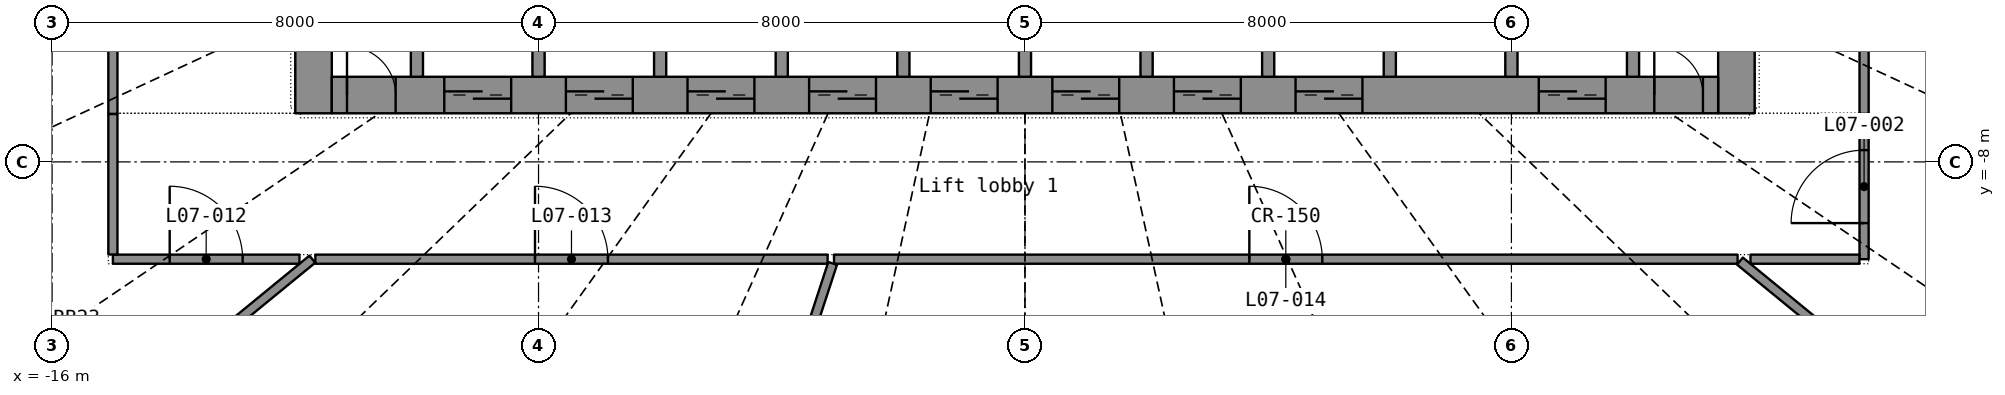
"""IFC4 building model, lengths in metres.
Left out: names, types, materials, properties, quantities, classifications, styles, units other than length and angle.
Written with IfcOpenShell. Run it as: python <this file> out.ifc"""

import sys

from ifc_helpers import new_model, si_unit, direction, frame, frame_2d, origin, place, context, subcontext, project, spatial, rectangle, extrude, element, fill, save


model = new_model("IFC4")
c1 = context("Model", 3, precision=1e-05, world=origin(), true_north=direction((0.0, 1.0)))
c2 = subcontext(c1, "Body", "Model", "MODEL_VIEW")
j1 = project(units=[si_unit("LENGTHUNIT", "METRE"), si_unit("PLANEANGLEUNIT", "RADIAN")], contexts=[c1])
p1 = place(None, origin())
s1 = spatial("IfcSite", under=j1, at=p1, CompositionType="ELEMENT")
p2 = place(p1, origin())
s2 = spatial("IfcBuilding", under=s1, at=p2, CompositionType="ELEMENT")
p3 = place(p2, frame((0.0, 0.0, 37.1)))
s3 = spatial("IfcBuildingStorey", under=s2, at=p3, CompositionType="ELEMENT", Elevation=37.1)
p4 = place(p3, frame((-11.7, -7.2, 0.0), z_axis=(0.0, 0.0, 1.0), x_axis=(0.0, 1.0, 0.0)))
e1 = element("IfcWall", 1, at=p4, inside=s3, PredefinedType="SHEAR", context=c2, shape_type="SweptSolid", body=[
    extrude(rectangle(XDim=14.4, YDim=0.6, at=frame_2d((7.2, 0.0))), origin(), (0.0, 0.0, 1.0), 3.3),
])
p5 = place(p4, frame((6.5, 0.0, 0.0)))
e2 = element("IfcOpeningElement", 2, at=p5, cuts=e1, PredefinedType="OPENING", context=c2, shape_type="SweptSolid", body=[
    extrude(rectangle(XDim=1.4, YDim=2.2, at=frame_2d((0.7, 1.1))), frame((0.0, 0.31, 0.0), z_axis=(0.0, -1.0, 0.0), x_axis=(1.0, 0.0, 0.0)), (0.0, 0.0, 1.0), 0.62),
])
p6 = place(p3, frame((11.7, -7.2, 0.0), z_axis=(0.0, 0.0, 1.0), x_axis=(0.0, 1.0, 0.0)))
e3 = element("IfcWall", 3, at=p6, inside=s3, PredefinedType="SHEAR", context=c2, shape_type="SweptSolid", body=[
    extrude(rectangle(XDim=14.4, YDim=0.6, at=frame_2d((7.2, 0.0))), origin(), (0.0, 0.0, 1.0), 3.3),
])
p7 = place(p6, frame((6.5, 0.0, 0.0)))
e4 = element("IfcOpeningElement", 4, at=p7, cuts=e3, PredefinedType="OPENING", context=c2, shape_type="SweptSolid", body=[
    extrude(rectangle(XDim=1.4, YDim=2.2, at=frame_2d((0.7, 1.1))), frame((0.0, 0.31, 0.0), z_axis=(0.0, -1.0, 0.0), x_axis=(1.0, 0.0, 0.0)), (0.0, 0.0, 1.0), 0.62),
])
p8 = place(p3, frame((-11.4, -6.9, 0.0), z_axis=(0.0, 0.0, 1.0), x_axis=(1.0, 0.0, 0.0)))
e5 = element("IfcWall", 5, at=p8, inside=s3, PredefinedType="SHEAR", context=c2, shape_type="SweptSolid", body=[
    extrude(rectangle(XDim=22.8, YDim=0.6, at=frame_2d((11.4, 0.0))), origin(), (0.0, 0.0, 1.0), 3.3),
])
p9 = place(p8, frame((1.85, 0.0, 0.0)))
e6 = element("IfcOpeningElement", 6, at=p9, cuts=e5, PredefinedType="OPENING", context=c2, shape_type="SweptSolid", body=[
    extrude(rectangle(XDim=1.1, YDim=2.2, at=frame_2d((0.55, 1.1))), frame((0.0, 0.31, 0.0), z_axis=(0.0, -1.0, 0.0), x_axis=(1.0, 0.0, 0.0)), (0.0, 0.0, 1.0), 0.62),
])
p10 = place(p8, frame((3.85, 0.0, 0.0)))
e7 = element("IfcOpeningElement", 7, at=p10, cuts=e5, PredefinedType="OPENING", context=c2, shape_type="SweptSolid", body=[
    extrude(rectangle(XDim=1.1, YDim=2.2, at=frame_2d((0.55, 1.1))), frame((0.0, 0.31, 0.0), z_axis=(0.0, -1.0, 0.0), x_axis=(1.0, 0.0, 0.0)), (0.0, 0.0, 1.0), 0.62),
])
p11 = place(p8, frame((5.85, 0.0, 0.0)))
e8 = element("IfcOpeningElement", 8, at=p11, cuts=e5, PredefinedType="OPENING", context=c2, shape_type="SweptSolid", body=[
    extrude(rectangle(XDim=1.1, YDim=2.2, at=frame_2d((0.55, 1.1))), frame((0.0, 0.31, 0.0), z_axis=(0.0, -1.0, 0.0), x_axis=(1.0, 0.0, 0.0)), (0.0, 0.0, 1.0), 0.62),
])
p12 = place(p8, frame((7.85, 0.0, 0.0)))
e9 = element("IfcOpeningElement", 9, at=p12, cuts=e5, PredefinedType="OPENING", context=c2, shape_type="SweptSolid", body=[
    extrude(rectangle(XDim=1.1, YDim=2.2, at=frame_2d((0.55, 1.1))), frame((0.0, 0.31, 0.0), z_axis=(0.0, -1.0, 0.0), x_axis=(1.0, 0.0, 0.0)), (0.0, 0.0, 1.0), 0.62),
])
p13 = place(p8, frame((9.85, 0.0, 0.0)))
e10 = element("IfcOpeningElement", 10, at=p13, cuts=e5, PredefinedType="OPENING", context=c2, shape_type="SweptSolid", body=[
    extrude(rectangle(XDim=1.1, YDim=2.2, at=frame_2d((0.55, 1.1))), frame((0.0, 0.31, 0.0), z_axis=(0.0, -1.0, 0.0), x_axis=(1.0, 0.0, 0.0)), (0.0, 0.0, 1.0), 0.62),
])
p14 = place(p8, frame((11.85, 0.0, 0.0)))
e11 = element("IfcOpeningElement", 11, at=p14, cuts=e5, PredefinedType="OPENING", context=c2, shape_type="SweptSolid", body=[
    extrude(rectangle(XDim=1.1, YDim=2.2, at=frame_2d((0.55, 1.1))), frame((0.0, 0.31, 0.0), z_axis=(0.0, -1.0, 0.0), x_axis=(1.0, 0.0, 0.0)), (0.0, 0.0, 1.0), 0.62),
])
p15 = place(p8, frame((13.85, 0.0, 0.0)))
e12 = element("IfcOpeningElement", 12, at=p15, cuts=e5, PredefinedType="OPENING", context=c2, shape_type="SweptSolid", body=[
    extrude(rectangle(XDim=1.1, YDim=2.2, at=frame_2d((0.55, 1.1))), frame((0.0, 0.31, 0.0), z_axis=(0.0, -1.0, 0.0), x_axis=(1.0, 0.0, 0.0)), (0.0, 0.0, 1.0), 0.62),
])
p16 = place(p8, frame((15.85, 0.0, 0.0)))
e13 = element("IfcOpeningElement", 13, at=p16, cuts=e5, PredefinedType="OPENING", context=c2, shape_type="SweptSolid", body=[
    extrude(rectangle(XDim=1.1, YDim=2.2, at=frame_2d((0.55, 1.1))), frame((0.0, 0.31, 0.0), z_axis=(0.0, -1.0, 0.0), x_axis=(1.0, 0.0, 0.0)), (0.0, 0.0, 1.0), 0.62),
])
p17 = place(p8, frame((19.85, 0.0, 0.0)))
e14 = element("IfcOpeningElement", 14, at=p17, cuts=e5, PredefinedType="OPENING", context=c2, shape_type="SweptSolid", body=[
    extrude(rectangle(XDim=1.1, YDim=2.2, at=frame_2d((0.55, 1.1))), frame((0.0, 0.31, 0.0), z_axis=(0.0, -1.0, 0.0), x_axis=(1.0, 0.0, 0.0)), (0.0, 0.0, 1.0), 0.62),
])
p18 = place(p8, frame((0.25, 0.0, 0.0)))
e15 = element("IfcOpeningElement", 15, at=p18, cuts=e5, PredefinedType="OPENING", context=c2, shape_type="SweptSolid", body=[
    extrude(rectangle(XDim=0.8, YDim=2.05, at=frame_2d((0.4, 1.025))), frame((0.0, 0.31, 0.0), z_axis=(0.0, -1.0, 0.0), x_axis=(1.0, 0.0, 0.0)), (0.0, 0.0, 1.0), 0.62),
])
p19 = place(p8, frame((21.75, 0.0, 0.0)))
e16 = element("IfcOpeningElement", 16, at=p19, cuts=e5, PredefinedType="OPENING", context=c2, shape_type="SweptSolid", body=[
    extrude(rectangle(XDim=0.8, YDim=2.05, at=frame_2d((0.4, 1.025))), frame((0.0, 0.31, 0.0), z_axis=(0.0, -1.0, 0.0), x_axis=(1.0, 0.0, 0.0)), (0.0, 0.0, 1.0), 0.62),
])
for number, where, z_axis, x_axis in (
    (17, (-10.0, -6.6, 0.0), (0.0, 0.0, 1.0), (0.0, 1.0, 0.0)),
    (18, (-8.0, -6.6, 0.0), (0.0, 0.0, 1.0), (0.0, 1.0, 0.0)),
    (19, (-6.0, -6.6, 0.0), (0.0, 0.0, 1.0), (0.0, 1.0, 0.0)),
    (20, (-4.0, -6.6, 0.0), (0.0, 0.0, 1.0), (0.0, 1.0, 0.0)),
    (21, (-2.0, -6.6, 0.0), (0.0, 0.0, 1.0), (0.0, 1.0, 0.0)),
    (22, (0.0, -6.6, 0.0), (0.0, 0.0, 1.0), (0.0, 1.0, 0.0)),
    (23, (2.0, -6.6, 0.0), (0.0, 0.0, 1.0), (0.0, 1.0, 0.0)),
    (24, (4.0, -6.6, 0.0), (0.0, 0.0, 1.0), (0.0, 1.0, 0.0)),
    (25, (6.0, -6.6, 0.0), (0.0, 0.0, 1.0), (0.0, 1.0, 0.0)),
    (26, (8.0, -6.6, 0.0), (0.0, 0.0, 1.0), (0.0, 1.0, 0.0)),
    (27, (10.0, -6.6, 0.0), (0.0, 0.0, 1.0), (0.0, 1.0, 0.0)),
):
    element("IfcWall", number, at=place(p3, frame(where, z_axis=z_axis, x_axis=x_axis)), inside=s3, PredefinedType="SHEAR", context=c2, shape_type="SweptSolid", body=[
        extrude(rectangle(XDim=2.7, YDim=0.2, at=frame_2d((1.35, 0.0))), origin(), (0.0, 0.0, 1.0), 3.3),
    ])
p20 = place(p3, frame((-3.14, -9.6, 0.0), z_axis=(0.0, 0.0, 1.0), x_axis=(1.0, 0.0, 0.0)))
e28 = element("IfcWall", 28, at=p20, inside=s3, PredefinedType="PARTITIONING", context=c2, shape_type="SweptSolid", body=[
    extrude(rectangle(XDim=14.86, YDim=0.15, at=frame_2d((7.43, 0.0))), origin(), (0.0, 0.0, 1.0), 2.4),
])
p21 = place(p20, frame((6.83, 0.0, 0.0)))
e29 = element("IfcOpeningElement", 29, at=p21, cuts=e28, PredefinedType="OPENING", context=c2, shape_type="SweptSolid", body=[
    extrude(rectangle(XDim=1.2, YDim=2.2, at=frame_2d((0.6, 1.1))), frame((0.0, 0.085, 0.0), z_axis=(0.0, -1.0, 0.0), x_axis=(1.0, 0.0, 0.0)), (0.0, 0.0, 1.0), 0.17),
])
p22 = place(p3, frame((-7.226, -22.091, 0.0), z_axis=(0.0, 0.0, 1.0), x_axis=(0.310909896, 0.950439391, 0.0)))
e30 = element("IfcWall", 30, at=p22, inside=s3, PredefinedType="PARTITIONING", context=c2, shape_type="SweptSolid", body=[
    extrude(rectangle(XDim=13.069, YDim=0.15, at=frame_2d((6.534, 0.0))), origin(), (0.0, 0.0, 1.0), 2.4),
])
p23 = place(p3, frame((-19.75, -16.178, 0.0), z_axis=(0.0, 0.0, 1.0), x_axis=(0.773607181, 0.633665471, 0.0)))
e31 = element("IfcWall", 31, at=p23, inside=s3, PredefinedType="PARTITIONING", context=c2, shape_type="SweptSolid", body=[
    extrude(rectangle(XDim=10.38, YDim=0.15, at=frame_2d((5.19, 0.0))), origin(), (0.0, 0.0, 1.0), 2.4),
])
p24 = place(p3, frame((11.758, -9.631, 0.0), z_axis=(0.0, 0.0, 1.0), x_axis=(0.773600236, -0.63367395, 0.0)))
e32 = element("IfcWall", 32, at=p24, inside=s3, PredefinedType="PARTITIONING", context=c2, shape_type="SweptSolid", body=[
    extrude(rectangle(XDim=10.331, YDim=0.15, at=frame_2d((5.166, 0.0))), origin(), (0.0, 0.0, 1.0), 2.4),
])
p25 = place(p3, frame((-11.67, -9.6, 0.0), z_axis=(0.0, 0.0, 1.0), x_axis=(1.0, 0.0, 0.0)))
e33 = element("IfcWall", 33, at=p25, inside=s3, PredefinedType="PARTITIONING", context=c2, shape_type="SweptSolid", body=[
    extrude(rectangle(XDim=8.425, YDim=0.15, at=frame_2d((4.212, 0.0))), origin(), (0.0, 0.0, 1.0), 2.4),
])
p26 = place(p25, frame((3.612, 0.0, 0.0)))
e34 = element("IfcOpeningElement", 34, at=p26, cuts=e33, PredefinedType="OPENING", context=c2, shape_type="SweptSolid", body=[
    extrude(rectangle(XDim=1.2, YDim=2.2, at=frame_2d((0.6, 1.1))), frame((0.0, 0.085, 0.0), z_axis=(0.0, -1.0, 0.0), x_axis=(1.0, 0.0, 0.0)), (0.0, 0.0, 1.0), 0.17),
])
p27 = place(p3, frame((13.8, -7.212, 0.0), z_axis=(0.0, 0.0, 1.0), x_axis=(0.0, 1.0, 0.0)))
e35 = element("IfcWall", 35, at=p27, inside=s3, PredefinedType="PARTITIONING", context=c2, shape_type="SweptSolid", body=[
    extrude(rectangle(XDim=8.124, YDim=0.15, at=frame_2d((4.062, 0.0))), origin(), (0.0, 0.0, 1.0), 2.4),
])
p28 = place(p27, frame((3.462, 0.0, 0.0)))
e36 = element("IfcOpeningElement", 36, at=p28, cuts=e35, PredefinedType="OPENING", context=c2, shape_type="SweptSolid", body=[
    extrude(rectangle(XDim=1.2, YDim=2.2, at=frame_2d((0.6, 1.1))), frame((0.0, 0.085, 0.0), z_axis=(0.0, -1.0, 0.0), x_axis=(1.0, 0.0, 0.0)), (0.0, 0.0, 1.0), 0.17),
])
p29 = place(p3, frame((-15.0, -3.387, 0.0), z_axis=(0.0, 0.0, 1.0), x_axis=(0.0, -1.0, 0.0)))
e37 = element("IfcWall", 37, at=p29, inside=s3, PredefinedType="PARTITIONING", context=c2, shape_type="SweptSolid", body=[
    extrude(rectangle(XDim=3.824, YDim=0.15, at=frame_2d((1.912, 0.0))), origin(), (0.0, 0.0, 1.0), 2.4),
])
p30 = place(p29, frame((1.312, 0.0, 0.0)))
e38 = element("IfcOpeningElement", 38, at=p30, cuts=e37, PredefinedType="OPENING", context=c2, shape_type="SweptSolid", body=[
    extrude(rectangle(XDim=1.2, YDim=2.2, at=frame_2d((0.6, 1.1))), frame((0.0, 0.085, 0.0), z_axis=(0.0, -1.0, 0.0), x_axis=(1.0, 0.0, 0.0)), (0.0, 0.0, 1.0), 0.17),
])
p31 = place(p3, frame((-15.0, -9.6, 0.0), z_axis=(0.0, 0.0, 1.0), x_axis=(1.0, 0.0, 0.0)))
e39 = element("IfcWall", 39, at=p31, inside=s3, PredefinedType="PARTITIONING", context=c2, shape_type="SweptSolid", body=[
    extrude(rectangle(XDim=3.068, YDim=0.15, at=frame_2d((1.534, 0.0))), origin(), (0.0, 0.0, 1.0), 2.4),
])
p32 = place(p31, frame((0.934, 0.0, 0.0)))
e40 = element("IfcOpeningElement", 40, at=p32, cuts=e39, PredefinedType="OPENING", context=c2, shape_type="SweptSolid", body=[
    extrude(rectangle(XDim=1.2, YDim=2.2, at=frame_2d((0.6, 1.1))), frame((0.0, 0.085, 0.0), z_axis=(0.0, -1.0, 0.0), x_axis=(1.0, 0.0, 0.0)), (0.0, 0.0, 1.0), 0.17),
])
p33 = place(p3, frame((-15.0, -7.213, 0.0), z_axis=(0.0, 0.0, 1.0), x_axis=(0.0, -1.0, 0.0)))
e41 = element("IfcWall", 41, at=p33, inside=s3, PredefinedType="PARTITIONING", context=c2, shape_type="SweptSolid", body=[
    extrude(rectangle(XDim=2.31, YDim=0.15, at=frame_2d((1.155, 0.0))), origin(), (0.0, 0.0, 1.0), 2.4),
])
p34 = place(p3, frame((13.8, -9.6, 0.0), z_axis=(0.0, 0.0, 1.0), x_axis=(0.0, 1.0, 0.0)))
e42 = element("IfcWall", 42, at=p34, inside=s3, PredefinedType="PARTITIONING", context=c2, shape_type="SweptSolid", body=[
    extrude(rectangle(XDim=2.387, YDim=0.15, at=frame_2d((1.194, 0.0))), origin(), (0.0, 0.0, 1.0), 2.4),
])
p35 = place(p34, frame((0.594, 0.0, 0.0)))
e43 = element("IfcOpeningElement", 43, at=p35, cuts=e42, PredefinedType="OPENING", context=c2, shape_type="SweptSolid", body=[
    extrude(rectangle(XDim=1.2, YDim=2.2, at=frame_2d((0.6, 1.1))), frame((0.0, 0.085, 0.0), z_axis=(0.0, -1.0, 0.0), x_axis=(1.0, 0.0, 0.0)), (0.0, 0.0, 1.0), 0.17),
])
p36 = place(p3, frame((11.932, -9.6, 0.0), z_axis=(0.0, 0.0, 1.0), x_axis=(1.0, 0.0, 0.0)))
e44 = element("IfcWall", 44, at=p36, inside=s3, PredefinedType="PARTITIONING", context=c2, shape_type="SweptSolid", body=[
    extrude(rectangle(XDim=1.791, YDim=0.15, at=frame_2d((0.896, 0.0))), origin(), (0.0, 0.0, 1.0), 2.4),
])
p37 = place(p9, origin())
e45 = element("IfcDoor", 45, at=p37, inside=s3, OperationType="DOUBLE_DOOR_SLIDING", PredefinedType="DOOR", context=c2, shape_type="SweptSolid", body=[
    extrude(rectangle(XDim=1.1, YDim=2.2, at=frame_2d((0.55, 1.1))), frame((0.0, 0.025, 0.0), z_axis=(0.0, -1.0, 0.0), x_axis=(1.0, 0.0, 0.0)), (0.0, 0.0, 1.0), 0.05),
])
fill(e6, e45)
p38 = place(p10, origin())
e46 = element("IfcDoor", 46, at=p38, inside=s3, OperationType="DOUBLE_DOOR_SLIDING", PredefinedType="DOOR", context=c2, shape_type="SweptSolid", body=[
    extrude(rectangle(XDim=1.1, YDim=2.2, at=frame_2d((0.55, 1.1))), frame((0.0, 0.025, 0.0), z_axis=(0.0, -1.0, 0.0), x_axis=(1.0, 0.0, 0.0)), (0.0, 0.0, 1.0), 0.05),
])
fill(e7, e46)
p39 = place(p11, origin())
e47 = element("IfcDoor", 47, at=p39, inside=s3, OperationType="DOUBLE_DOOR_SLIDING", PredefinedType="DOOR", context=c2, shape_type="SweptSolid", body=[
    extrude(rectangle(XDim=1.1, YDim=2.2, at=frame_2d((0.55, 1.1))), frame((0.0, 0.025, 0.0), z_axis=(0.0, -1.0, 0.0), x_axis=(1.0, 0.0, 0.0)), (0.0, 0.0, 1.0), 0.05),
])
fill(e8, e47)
p40 = place(p12, origin())
e48 = element("IfcDoor", 48, at=p40, inside=s3, OperationType="DOUBLE_DOOR_SLIDING", PredefinedType="DOOR", context=c2, shape_type="SweptSolid", body=[
    extrude(rectangle(XDim=1.1, YDim=2.2, at=frame_2d((0.55, 1.1))), frame((0.0, 0.025, 0.0), z_axis=(0.0, -1.0, 0.0), x_axis=(1.0, 0.0, 0.0)), (0.0, 0.0, 1.0), 0.05),
])
fill(e9, e48)
p41 = place(p13, origin())
e49 = element("IfcDoor", 49, at=p41, inside=s3, OperationType="DOUBLE_DOOR_SLIDING", PredefinedType="DOOR", context=c2, shape_type="SweptSolid", body=[
    extrude(rectangle(XDim=1.1, YDim=2.2, at=frame_2d((0.55, 1.1))), frame((0.0, 0.025, 0.0), z_axis=(0.0, -1.0, 0.0), x_axis=(1.0, 0.0, 0.0)), (0.0, 0.0, 1.0), 0.05),
])
fill(e10, e49)
p42 = place(p14, origin())
e50 = element("IfcDoor", 50, at=p42, inside=s3, OperationType="DOUBLE_DOOR_SLIDING", PredefinedType="DOOR", context=c2, shape_type="SweptSolid", body=[
    extrude(rectangle(XDim=1.1, YDim=2.2, at=frame_2d((0.55, 1.1))), frame((0.0, 0.025, 0.0), z_axis=(0.0, -1.0, 0.0), x_axis=(1.0, 0.0, 0.0)), (0.0, 0.0, 1.0), 0.05),
])
fill(e11, e50)
p43 = place(p15, origin())
e51 = element("IfcDoor", 51, at=p43, inside=s3, OperationType="DOUBLE_DOOR_SLIDING", PredefinedType="DOOR", context=c2, shape_type="SweptSolid", body=[
    extrude(rectangle(XDim=1.1, YDim=2.2, at=frame_2d((0.55, 1.1))), frame((0.0, 0.025, 0.0), z_axis=(0.0, -1.0, 0.0), x_axis=(1.0, 0.0, 0.0)), (0.0, 0.0, 1.0), 0.05),
])
fill(e12, e51)
p44 = place(p16, origin())
e52 = element("IfcDoor", 52, at=p44, inside=s3, OperationType="DOUBLE_DOOR_SLIDING", PredefinedType="DOOR", context=c2, shape_type="SweptSolid", body=[
    extrude(rectangle(XDim=1.1, YDim=2.2, at=frame_2d((0.55, 1.1))), frame((0.0, 0.025, 0.0), z_axis=(0.0, -1.0, 0.0), x_axis=(1.0, 0.0, 0.0)), (0.0, 0.0, 1.0), 0.05),
])
fill(e13, e52)
p45 = place(p17, origin())
e53 = element("IfcDoor", 53, at=p45, inside=s3, OperationType="DOUBLE_DOOR_SLIDING", PredefinedType="DOOR", context=c2, shape_type="SweptSolid", body=[
    extrude(rectangle(XDim=1.1, YDim=2.2, at=frame_2d((0.55, 1.1))), frame((0.0, 0.025, 0.0), z_axis=(0.0, -1.0, 0.0), x_axis=(1.0, 0.0, 0.0)), (0.0, 0.0, 1.0), 0.05),
])
fill(e14, e53)
p46 = place(p18, origin())
e54 = element("IfcDoor", 54, at=p46, inside=s3, OperationType="SINGLE_SWING_LEFT", PredefinedType="DOOR", context=c2, shape_type="SweptSolid", body=[
    extrude(rectangle(XDim=0.8, YDim=2.05, at=frame_2d((0.4, 1.025))), frame((0.0, 0.025, 0.0), z_axis=(0.0, -1.0, 0.0), x_axis=(1.0, 0.0, 0.0)), (0.0, 0.0, 1.0), 0.05),
])
fill(e15, e54)
p47 = place(p19, origin())
e55 = element("IfcDoor", 55, at=p47, inside=s3, OperationType="SINGLE_SWING_LEFT", PredefinedType="DOOR", context=c2, shape_type="SweptSolid", body=[
    extrude(rectangle(XDim=0.8, YDim=2.05, at=frame_2d((0.4, 1.025))), frame((0.0, 0.025, 0.0), z_axis=(0.0, -1.0, 0.0), x_axis=(1.0, 0.0, 0.0)), (0.0, 0.0, 1.0), 0.05),
])
fill(e16, e55)
p48 = place(p35, origin())
e56 = element("IfcDoor", 56, at=p48, inside=s3, OperationType="DOUBLE_DOOR_SINGLE_SWING", PredefinedType="DOOR", context=c2, shape_type="SweptSolid", body=[
    extrude(rectangle(XDim=1.2, YDim=2.2, at=frame_2d((0.6, 1.1))), frame((0.0, 0.025, 0.0), z_axis=(0.0, -1.0, 0.0), x_axis=(1.0, 0.0, 0.0)), (0.0, 0.0, 1.0), 0.05),
])
fill(e43, e56)
p49 = place(p32, origin())
e57 = element("IfcDoor", 57, at=p49, inside=s3, OperationType="DOUBLE_DOOR_SINGLE_SWING", PredefinedType="DOOR", context=c2, shape_type="SweptSolid", body=[
    extrude(rectangle(XDim=1.2, YDim=2.2, at=frame_2d((0.6, 1.1))), frame((0.0, 0.025, 0.0), z_axis=(0.0, -1.0, 0.0), x_axis=(1.0, 0.0, 0.0)), (0.0, 0.0, 1.0), 0.05),
])
fill(e40, e57)
p50 = place(p26, origin())
e58 = element("IfcDoor", 58, at=p50, inside=s3, OperationType="DOUBLE_DOOR_SINGLE_SWING", PredefinedType="DOOR", context=c2, shape_type="SweptSolid", body=[
    extrude(rectangle(XDim=1.2, YDim=2.2, at=frame_2d((0.6, 1.1))), frame((0.0, 0.025, 0.0), z_axis=(0.0, -1.0, 0.0), x_axis=(1.0, 0.0, 0.0)), (0.0, 0.0, 1.0), 0.05),
])
fill(e34, e58)
p51 = place(p21, origin())
e59 = element("IfcDoor", 59, at=p51, inside=s3, OperationType="DOUBLE_DOOR_SINGLE_SWING", PredefinedType="DOOR", context=c2, shape_type="SweptSolid", body=[
    extrude(rectangle(XDim=1.2, YDim=2.2, at=frame_2d((0.6, 1.1))), frame((0.0, 0.025, 0.0), z_axis=(0.0, -1.0, 0.0), x_axis=(1.0, 0.0, 0.0)), (0.0, 0.0, 1.0), 0.05),
])
fill(e29, e59)
save(model, sys.argv[1])
